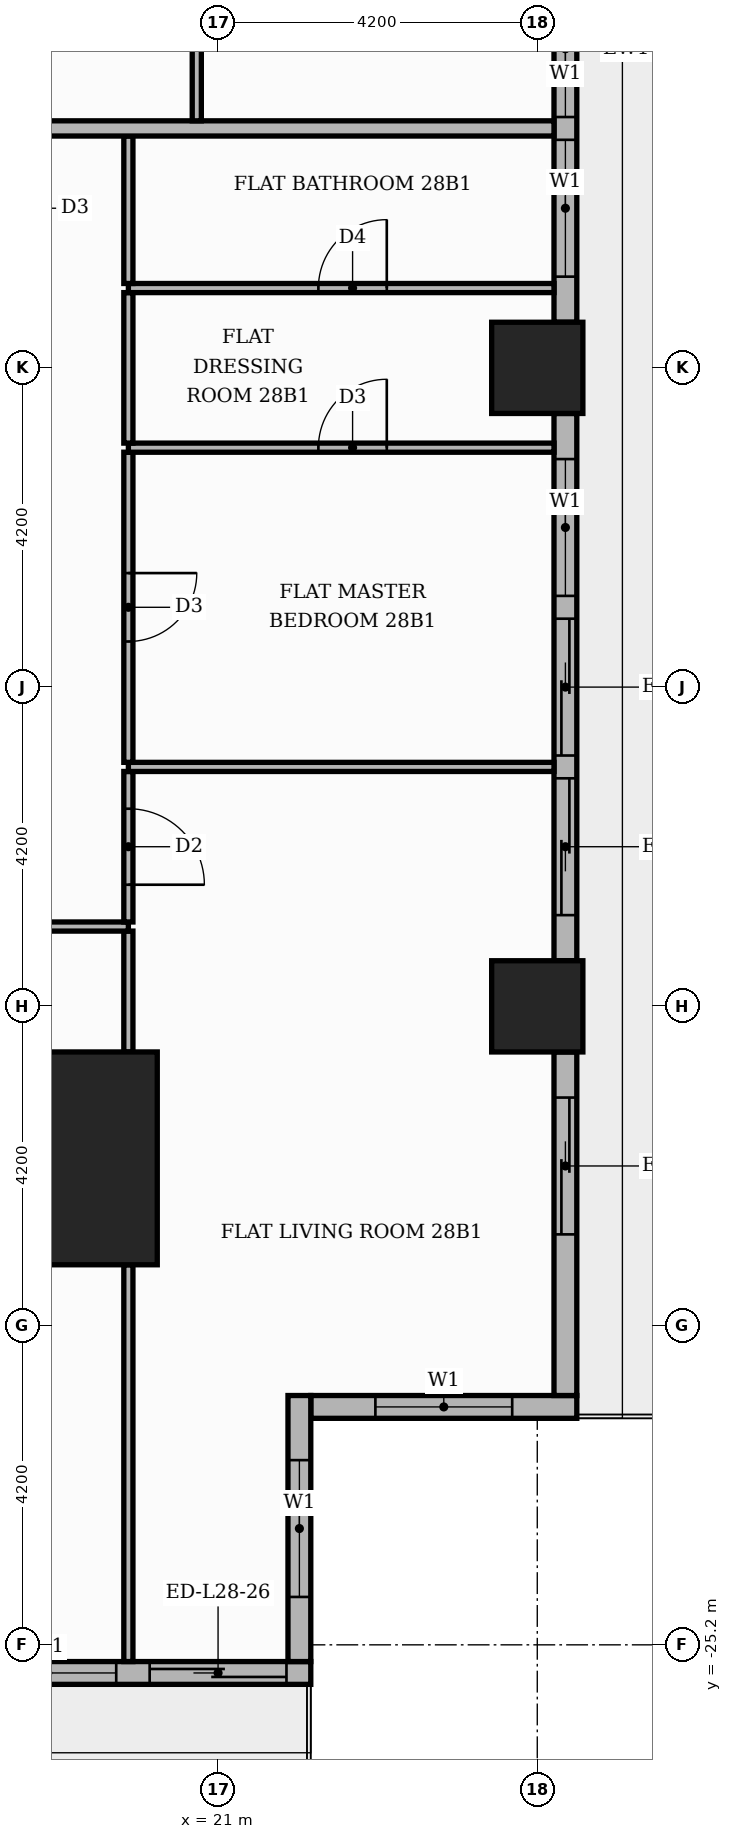
"""IFC4 building model, lengths in metres.
Left out: names, types, materials, properties, quantities, classifications, styles, units other than length and angle.
Written with IfcOpenShell. Run it as: python <this file> out.ifc"""

import sys

from ifc_helpers import new_model, si_unit, direction, frame, frame_2d, origin, origin_2d, place, context, subcontext, project, spatial, rectangle, extrude, element, fill, save


model = new_model("IFC4")
c1 = context("Model", 3, precision=1e-05, world=origin(), true_north=direction((0.0, 1.0)))
c2 = subcontext(c1, "Body", "Model", "MODEL_VIEW")
j1 = project(units=[si_unit("LENGTHUNIT", "METRE"), si_unit("PLANEANGLEUNIT", "RADIAN")], contexts=[c1])
p1 = place(None, origin())
s1 = spatial("IfcSite", under=j1, at=p1, CompositionType="ELEMENT")
p2 = place(p1, origin())
s2 = spatial("IfcBuilding", under=s1, at=p2, CompositionType="ELEMENT")
p3 = place(p2, frame((0.0, 0.0, 118.2)))
s3 = spatial("IfcBuildingStorey", under=s2, at=p3, CompositionType="ELEMENT", Elevation=118.2)
p4 = place(p3, frame((18.8, -18.8, 0.0), z_axis=(0.0, 0.0, 1.0), x_axis=(1.0, 0.0, 0.0)))
e1 = element("IfcColumn", 1, at=p4, inside=s3, PredefinedType="COLUMN", context=c2, shape_type="SweptSolid", body=[
    extrude(rectangle(XDim=2.8, YDim=2.8, at=origin_2d()), origin(), (0.0, 0.0, 1.0), 3.9),
])
for number, where, z_axis, x_axis in (
    (2, (25.2, -8.4, 0.0), (0.0, 0.0, 1.0), (1.0, 0.0, 0.0)),
    (3, (25.2, -16.8, 0.0), (0.0, 0.0, 1.0), (1.0, 0.0, 0.0)),
):
    element("IfcColumn", number, at=place(p3, frame(where, z_axis=z_axis, x_axis=x_axis)), inside=s3, PredefinedType="COLUMN", context=c2, shape_type="SweptSolid", body=[
        extrude(rectangle(XDim=1.2, YDim=1.2, at=origin_2d()), origin(), (0.0, 0.0, 1.0), 3.9),
    ])
p5 = place(p3, frame((22.22, -22.07, 0.0), z_axis=(0.0, 0.0, 1.0), x_axis=(1.0, 0.0, 0.0)))
e4 = element("IfcWall", 4, at=p5, inside=s3, PredefinedType="STANDARD", context=c2, shape_type="SweptSolid", body=[
    extrude(rectangle(XDim=3.5, YDim=0.3, at=frame_2d((1.75, 0.0))), origin(), (0.0, 0.0, 1.0), 3.48),
])
p6 = place(p5, frame((0.85, 0.0, 0.9)))
e5 = element("IfcOpeningElement", 5, at=p6, cuts=e4, PredefinedType="OPENING", context=c2, shape_type="SweptSolid", body=[
    extrude(rectangle(XDim=1.8, YDim=2.1, at=frame_2d((0.9, 1.05))), frame((0.0, 0.16, 0.0), z_axis=(0.0, -1.0, 0.0), x_axis=(1.0, 0.0, 0.0)), (0.0, 0.0, 1.0), 0.32),
])
p7 = place(p3, frame((25.57, -21.92, 0.0), z_axis=(0.0, 0.0, 1.0), x_axis=(0.0, 1.0, 0.0)))
e6 = element("IfcWall", 6, at=p7, inside=s3, PredefinedType="STANDARD", context=c2, shape_type="SweptSolid", body=[
    extrude(rectangle(XDim=4.52, YDim=0.3, at=frame_2d((2.26, 0.0))), origin(), (0.0, 0.0, 1.0), 3.48),
])
p8 = place(p7, frame((2.12, 0.0, 0.0)))
e7 = element("IfcOpeningElement", 7, at=p8, cuts=e6, PredefinedType="OPENING", context=c2, shape_type="SweptSolid", body=[
    extrude(rectangle(XDim=1.8, YDim=2.4, at=frame_2d((0.9, 1.2))), frame((0.0, 0.16, 0.0), z_axis=(0.0, -1.0, 0.0), x_axis=(1.0, 0.0, 0.0)), (0.0, 0.0, 1.0), 0.32),
])
p9 = place(p3, frame((25.57, -16.2, 0.0), z_axis=(0.0, 0.0, 1.0), x_axis=(0.0, 1.0, 0.0)))
e8 = element("IfcWall", 8, at=p9, inside=s3, PredefinedType="STANDARD", context=c2, shape_type="SweptSolid", body=[
    extrude(rectangle(XDim=7.2, YDim=0.3, at=frame_2d((3.6, 0.0))), origin(), (0.0, 0.0, 1.0), 3.48),
])
p10 = place(p9, frame((0.6, 0.0, 0.0)))
e9 = element("IfcOpeningElement", 9, at=p10, cuts=e8, PredefinedType="OPENING", context=c2, shape_type="SweptSolid", body=[
    extrude(rectangle(XDim=1.8, YDim=2.4, at=frame_2d((0.9, 1.2))), frame((0.0, 0.16, 0.0), z_axis=(0.0, -1.0, 0.0), x_axis=(1.0, 0.0, 0.0)), (0.0, 0.0, 1.0), 0.32),
])
p11 = place(p9, frame((2.7, 0.0, 0.0)))
e10 = element("IfcOpeningElement", 10, at=p11, cuts=e8, PredefinedType="OPENING", context=c2, shape_type="SweptSolid", body=[
    extrude(rectangle(XDim=1.8, YDim=2.4, at=frame_2d((0.9, 1.2))), frame((0.0, 0.16, 0.0), z_axis=(0.0, -1.0, 0.0), x_axis=(1.0, 0.0, 0.0)), (0.0, 0.0, 1.0), 0.32),
])
p12 = place(p9, frame((4.8, 0.0, 0.9)))
e11 = element("IfcOpeningElement", 11, at=p12, cuts=e8, PredefinedType="OPENING", context=c2, shape_type="SweptSolid", body=[
    extrude(rectangle(XDim=1.8, YDim=2.1, at=frame_2d((0.9, 1.05))), frame((0.0, 0.16, 0.0), z_axis=(0.0, -1.0, 0.0), x_axis=(1.0, 0.0, 0.0)), (0.0, 0.0, 1.0), 0.32),
])
p13 = place(p3, frame((25.57, -7.8, 0.0), z_axis=(0.0, 0.0, 1.0), x_axis=(0.0, 1.0, 0.0)))
e12 = element("IfcWall", 12, at=p13, inside=s3, PredefinedType="STANDARD", context=c2, shape_type="SweptSolid", body=[
    extrude(rectangle(XDim=7.2, YDim=0.3, at=frame_2d((3.6, 0.0))), origin(), (0.0, 0.0, 1.0), 3.48),
])
p14 = place(p13, frame((0.6, 0.0, 0.9)))
e13 = element("IfcOpeningElement", 13, at=p14, cuts=e12, PredefinedType="OPENING", context=c2, shape_type="SweptSolid", body=[
    extrude(rectangle(XDim=1.8, YDim=2.1, at=frame_2d((0.9, 1.05))), frame((0.0, 0.16, 0.0), z_axis=(0.0, -1.0, 0.0), x_axis=(1.0, 0.0, 0.0)), (0.0, 0.0, 1.0), 0.32),
])
p15 = place(p13, frame((2.7, 0.0, 0.9)))
e14 = element("IfcOpeningElement", 14, at=p15, cuts=e12, PredefinedType="OPENING", context=c2, shape_type="SweptSolid", body=[
    extrude(rectangle(XDim=1.8, YDim=2.1, at=frame_2d((0.9, 1.05))), frame((0.0, 0.16, 0.0), z_axis=(0.0, -1.0, 0.0), x_axis=(1.0, 0.0, 0.0)), (0.0, 0.0, 1.0), 0.32),
])
p16 = place(p13, frame((4.8, 0.0, 0.0)))
e15 = element("IfcOpeningElement", 15, at=p16, cuts=e12, PredefinedType="OPENING", context=c2, shape_type="SweptSolid", body=[
    extrude(rectangle(XDim=1.8, YDim=2.4, at=frame_2d((0.9, 1.2))), frame((0.0, 0.16, 0.0), z_axis=(0.0, -1.0, 0.0), x_axis=(1.0, 0.0, 0.0)), (0.0, 0.0, 1.0), 0.32),
])
p17 = place(p3, frame((17.4, -25.57, 0.0), z_axis=(0.0, 0.0, 1.0), x_axis=(1.0, 0.0, 0.0)))
e16 = element("IfcWall", 16, at=p17, inside=s3, PredefinedType="STANDARD", context=c2, shape_type="SweptSolid", body=[
    extrude(rectangle(XDim=4.82, YDim=0.3, at=frame_2d((2.41, 0.0))), origin(), (0.0, 0.0, 1.0), 3.48),
])
p18 = place(p17, frame((2.7, 0.0, 0.0)))
e17 = element("IfcOpeningElement", 17, at=p18, cuts=e16, PredefinedType="OPENING", context=c2, shape_type="SweptSolid", body=[
    extrude(rectangle(XDim=1.8, YDim=2.4, at=frame_2d((0.9, 1.2))), frame((0.0, 0.16, 0.0), z_axis=(0.0, -1.0, 0.0), x_axis=(1.0, 0.0, 0.0)), (0.0, 0.0, 1.0), 0.32),
])
p19 = place(p17, frame((0.46, 0.0, 0.9)))
e18 = element("IfcOpeningElement", 18, at=p19, cuts=e16, PredefinedType="OPENING", context=c2, shape_type="SweptSolid", body=[
    extrude(rectangle(XDim=1.8, YDim=2.1, at=frame_2d((0.9, 1.05))), frame((0.0, 0.16, 0.0), z_axis=(0.0, -1.0, 0.0), x_axis=(1.0, 0.0, 0.0)), (0.0, 0.0, 1.0), 0.32),
])
p20 = place(p3, frame((22.07, -25.42, 0.0), z_axis=(0.0, 0.0, 1.0), x_axis=(0.0, 1.0, 0.0)))
e19 = element("IfcWall", 19, at=p20, inside=s3, PredefinedType="STANDARD", context=c2, shape_type="SweptSolid", body=[
    extrude(rectangle(XDim=3.5, YDim=0.3, at=frame_2d((1.75, 0.0))), origin(), (0.0, 0.0, 1.0), 3.48),
])
p21 = place(p20, frame((0.85, 0.0, 0.9)))
e20 = element("IfcOpeningElement", 20, at=p21, cuts=e19, PredefinedType="OPENING", context=c2, shape_type="SweptSolid", body=[
    extrude(rectangle(XDim=1.8, YDim=2.1, at=frame_2d((0.9, 1.05))), frame((0.0, 0.16, 0.0), z_axis=(0.0, -1.0, 0.0), x_axis=(1.0, 0.0, 0.0)), (0.0, 0.0, 1.0), 0.32),
])
p22 = place(p3, frame((19.82, -25.42, 0.0), z_axis=(0.0, 0.0, 1.0), x_axis=(0.0, 1.0, 0.0)))
e21 = element("IfcWall", 21, at=p22, inside=s3, PredefinedType="PARTITIONING", context=c2, shape_type="SweptSolid", body=[
    extrude(rectangle(XDim=5.22, YDim=0.12, at=frame_2d((2.61, 0.0))), origin(), (0.0, 0.0, 1.0), 3.48),
])
p23 = place(p3, frame((19.82, -17.4, 0.0), z_axis=(0.0, 0.0, 1.0), x_axis=(0.0, 1.0, 0.0)))
e22 = element("IfcWall", 22, at=p23, inside=s3, PredefinedType="PARTITIONING", context=c2, shape_type="SweptSolid", body=[
    extrude(rectangle(XDim=1.59, YDim=0.12, at=frame_2d((0.795, 0.0))), origin(), (0.0, 0.0, 1.0), 3.48),
])
p24 = place(p3, frame((13.75, -15.75, 0.0), z_axis=(0.0, 0.0, 1.0), x_axis=(1.0, 0.0, 0.0)))
e23 = element("IfcWall", 23, at=p24, inside=s3, PredefinedType="PARTITIONING", context=c2, shape_type="SweptSolid", body=[
    extrude(rectangle(XDim=6.07, YDim=0.12, at=frame_2d((3.035, 0.0))), origin(), (0.0, 0.0, 1.0), 3.48),
])
p25 = place(p24, frame((2.485, 0.0, 0.0)))
e24 = element("IfcOpeningElement", 24, at=p25, cuts=e23, PredefinedType="OPENING", context=c2, shape_type="SweptSolid", body=[
    extrude(rectangle(XDim=1.0, YDim=2.1, at=frame_2d((0.5, 1.05))), frame((0.0, 0.07, 0.0), z_axis=(0.0, -1.0, 0.0), x_axis=(1.0, 0.0, 0.0)), (0.0, 0.0, 1.0), 0.14),
])
p26 = place(p3, frame((19.82, -15.69, 0.0), z_axis=(0.0, 0.0, 1.0), x_axis=(0.0, 1.0, 0.0)))
e25 = element("IfcWall", 25, at=p26, inside=s3, PredefinedType="PARTITIONING", context=c2, shape_type="SweptSolid", body=[
    extrude(rectangle(XDim=1.98, YDim=0.12, at=frame_2d((0.99, 0.0))), origin(), (0.0, 0.0, 1.0), 3.48),
])
p27 = place(p26, frame((0.49, 0.0, 0.0)))
e26 = element("IfcOpeningElement", 26, at=p27, cuts=e25, PredefinedType="OPENING", context=c2, shape_type="SweptSolid", body=[
    extrude(rectangle(XDim=1.0, YDim=2.1, at=frame_2d((0.5, 1.05))), frame((0.0, 0.07, 0.0), z_axis=(0.0, -1.0, 0.0), x_axis=(1.0, 0.0, 0.0)), (0.0, 0.0, 1.0), 0.14),
])
p28 = place(p3, frame((19.82, -13.65, 0.0), z_axis=(0.0, 0.0, 1.0), x_axis=(1.0, 0.0, 0.0)))
e27 = element("IfcWall", 27, at=p28, inside=s3, PredefinedType="PARTITIONING", context=c2, shape_type="SweptSolid", body=[
    extrude(rectangle(XDim=5.6, YDim=0.12, at=frame_2d((2.8, 0.0))), origin(), (0.0, 0.0, 1.0), 3.48),
])
p29 = place(p3, frame((19.82, -13.59, 0.0), z_axis=(0.0, 0.0, 1.0), x_axis=(0.0, 1.0, 0.0)))
e28 = element("IfcWall", 28, at=p29, inside=s3, PredefinedType="PARTITIONING", context=c2, shape_type="SweptSolid", body=[
    extrude(rectangle(XDim=4.08, YDim=0.12, at=frame_2d((2.04, 0.0))), origin(), (0.0, 0.0, 1.0), 3.48),
])
p30 = place(p29, frame((1.59, 0.0, 0.0)))
e29 = element("IfcOpeningElement", 29, at=p30, cuts=e28, PredefinedType="OPENING", context=c2, shape_type="SweptSolid", body=[
    extrude(rectangle(XDim=0.9, YDim=2.1, at=frame_2d((0.45, 1.05))), frame((0.0, 0.07, 0.0), z_axis=(0.0, -1.0, 0.0), x_axis=(1.0, 0.0, 0.0)), (0.0, 0.0, 1.0), 0.14),
])
p31 = place(p3, frame((19.82, -9.45, 0.0), z_axis=(0.0, 0.0, 1.0), x_axis=(1.0, 0.0, 0.0)))
e30 = element("IfcWall", 30, at=p31, inside=s3, PredefinedType="PARTITIONING", context=c2, shape_type="SweptSolid", body=[
    extrude(rectangle(XDim=5.6, YDim=0.12, at=frame_2d((2.8, 0.0))), origin(), (0.0, 0.0, 1.0), 3.48),
])
p32 = place(p31, frame((2.5, 0.0, 0.0)))
e31 = element("IfcOpeningElement", 31, at=p32, cuts=e30, PredefinedType="OPENING", context=c2, shape_type="SweptSolid", body=[
    extrude(rectangle(XDim=0.9, YDim=2.1, at=frame_2d((0.45, 1.05))), frame((0.0, 0.07, 0.0), z_axis=(0.0, -1.0, 0.0), x_axis=(1.0, 0.0, 0.0)), (0.0, 0.0, 1.0), 0.14),
])
p33 = place(p3, frame((19.82, -9.39, 0.0), z_axis=(0.0, 0.0, 1.0), x_axis=(0.0, 1.0, 0.0)))
e32 = element("IfcWall", 32, at=p33, inside=s3, PredefinedType="PARTITIONING", context=c2, shape_type="SweptSolid", body=[
    extrude(rectangle(XDim=1.98, YDim=0.12, at=frame_2d((0.99, 0.0))), origin(), (0.0, 0.0, 1.0), 3.48),
])
p34 = place(p3, frame((19.82, -7.35, 0.0), z_axis=(0.0, 0.0, 1.0), x_axis=(1.0, 0.0, 0.0)))
e33 = element("IfcWall", 33, at=p34, inside=s3, PredefinedType="PARTITIONING", context=c2, shape_type="SweptSolid", body=[
    extrude(rectangle(XDim=5.6, YDim=0.12, at=frame_2d((2.8, 0.0))), origin(), (0.0, 0.0, 1.0), 3.48),
])
p35 = place(p34, frame((2.5, 0.0, 0.0)))
e34 = element("IfcOpeningElement", 34, at=p35, cuts=e33, PredefinedType="OPENING", context=c2, shape_type="SweptSolid", body=[
    extrude(rectangle(XDim=0.9, YDim=2.1, at=frame_2d((0.45, 1.05))), frame((0.0, 0.07, 0.0), z_axis=(0.0, -1.0, 0.0), x_axis=(1.0, 0.0, 0.0)), (0.0, 0.0, 1.0), 0.14),
])
p36 = place(p3, frame((19.82, -7.29, 0.0), z_axis=(0.0, 0.0, 1.0), x_axis=(0.0, 1.0, 0.0)))
e35 = element("IfcWall", 35, at=p36, inside=s3, PredefinedType="PARTITIONING", context=c2, shape_type="SweptSolid", body=[
    extrude(rectangle(XDim=1.94, YDim=0.12, at=frame_2d((0.97, 0.0))), origin(), (0.0, 0.0, 1.0), 3.48),
])
p37 = place(p3, frame((13.65, -5.25, 0.0), z_axis=(0.0, 0.0, 1.0), x_axis=(1.0, 0.0, 0.0)))
e36 = element("IfcWall", 36, at=p37, inside=s3, PredefinedType="PARTITIONING", context=c2, shape_type="SweptSolid", body=[
    extrude(rectangle(XDim=11.77, YDim=0.2, at=frame_2d((5.885, 0.0))), origin(), (0.0, 0.0, 1.0), 3.48),
])
p38 = place(p3, frame((20.72, -5.15, 0.0), z_axis=(0.0, 0.0, 1.0), x_axis=(0.0, 1.0, 0.0)))
e37 = element("IfcWall", 37, at=p38, inside=s3, PredefinedType="PARTITIONING", context=c2, shape_type="SweptSolid", body=[
    extrude(rectangle(XDim=8.24, YDim=0.12, at=frame_2d((4.12, 0.0))), origin(), (0.0, 0.0, 1.0), 3.48),
])
p39 = place(p38, frame((3.65, 0.0, 0.0)))
e38 = element("IfcOpeningElement", 38, at=p39, cuts=e37, PredefinedType="OPENING", context=c2, shape_type="SweptSolid", body=[
    extrude(rectangle(XDim=0.9, YDim=2.1, at=frame_2d((0.45, 1.05))), frame((0.0, 0.07, 0.0), z_axis=(0.0, -1.0, 0.0), x_axis=(1.0, 0.0, 0.0)), (0.0, 0.0, 1.0), 0.14),
])
p40 = place(p6, origin())
e39 = element("IfcWindow", 39, at=p40, inside=s3, PartitioningType="SINGLE_PANEL", PredefinedType="WINDOW", context=c2, shape_type="SweptSolid", body=[
    extrude(rectangle(XDim=1.8, YDim=2.1, at=frame_2d((0.9, 1.05))), frame((0.0, 0.03, 0.0), z_axis=(0.0, -1.0, 0.0), x_axis=(1.0, 0.0, 0.0)), (0.0, 0.0, 1.0), 0.06),
])
fill(e5, e39)
p41 = place(p8, origin())
e40 = element("IfcDoor", 40, at=p41, inside=s3, OperationType="SLIDING_TO_RIGHT", PredefinedType="DOOR", context=c2, shape_type="SweptSolid", body=[
    extrude(rectangle(XDim=1.8, YDim=2.4, at=frame_2d((0.9, 1.2))), frame((0.0, 0.025, 0.0), z_axis=(0.0, -1.0, 0.0), x_axis=(1.0, 0.0, 0.0)), (0.0, 0.0, 1.0), 0.05),
])
fill(e7, e40)
p42 = place(p10, origin())
e41 = element("IfcDoor", 41, at=p42, inside=s3, OperationType="SLIDING_TO_LEFT", PredefinedType="DOOR", context=c2, shape_type="SweptSolid", body=[
    extrude(rectangle(XDim=1.8, YDim=2.4, at=frame_2d((0.9, 1.2))), frame((0.0, 0.025, 0.0), z_axis=(0.0, -1.0, 0.0), x_axis=(1.0, 0.0, 0.0)), (0.0, 0.0, 1.0), 0.05),
])
fill(e9, e41)
p43 = place(p11, origin())
e42 = element("IfcDoor", 42, at=p43, inside=s3, OperationType="SLIDING_TO_RIGHT", PredefinedType="DOOR", context=c2, shape_type="SweptSolid", body=[
    extrude(rectangle(XDim=1.8, YDim=2.4, at=frame_2d((0.9, 1.2))), frame((0.0, 0.025, 0.0), z_axis=(0.0, -1.0, 0.0), x_axis=(1.0, 0.0, 0.0)), (0.0, 0.0, 1.0), 0.05),
])
fill(e10, e42)
p44 = place(p12, origin())
e43 = element("IfcWindow", 43, at=p44, inside=s3, PartitioningType="SINGLE_PANEL", PredefinedType="WINDOW", context=c2, shape_type="SweptSolid", body=[
    extrude(rectangle(XDim=1.8, YDim=2.1, at=frame_2d((0.9, 1.05))), frame((0.0, 0.03, 0.0), z_axis=(0.0, -1.0, 0.0), x_axis=(1.0, 0.0, 0.0)), (0.0, 0.0, 1.0), 0.06),
])
fill(e11, e43)
p45 = place(p14, origin())
e44 = element("IfcWindow", 44, at=p45, inside=s3, PartitioningType="SINGLE_PANEL", PredefinedType="WINDOW", context=c2, shape_type="SweptSolid", body=[
    extrude(rectangle(XDim=1.8, YDim=2.1, at=frame_2d((0.9, 1.05))), frame((0.0, 0.03, 0.0), z_axis=(0.0, -1.0, 0.0), x_axis=(1.0, 0.0, 0.0)), (0.0, 0.0, 1.0), 0.06),
])
fill(e13, e44)
p46 = place(p15, origin())
e45 = element("IfcWindow", 45, at=p46, inside=s3, PartitioningType="SINGLE_PANEL", PredefinedType="WINDOW", context=c2, shape_type="SweptSolid", body=[
    extrude(rectangle(XDim=1.8, YDim=2.1, at=frame_2d((0.9, 1.05))), frame((0.0, 0.03, 0.0), z_axis=(0.0, -1.0, 0.0), x_axis=(1.0, 0.0, 0.0)), (0.0, 0.0, 1.0), 0.06),
])
fill(e14, e45)
p47 = place(p18, origin())
e46 = element("IfcDoor", 46, at=p47, inside=s3, OperationType="SLIDING_TO_LEFT", PredefinedType="DOOR", context=c2, shape_type="SweptSolid", body=[
    extrude(rectangle(XDim=1.8, YDim=2.4, at=frame_2d((0.9, 1.2))), frame((0.0, 0.025, 0.0), z_axis=(0.0, -1.0, 0.0), x_axis=(1.0, 0.0, 0.0)), (0.0, 0.0, 1.0), 0.05),
])
fill(e17, e46)
p48 = place(p19, origin())
e47 = element("IfcWindow", 47, at=p48, inside=s3, PartitioningType="SINGLE_PANEL", PredefinedType="WINDOW", context=c2, shape_type="SweptSolid", body=[
    extrude(rectangle(XDim=1.8, YDim=2.1, at=frame_2d((0.9, 1.05))), frame((0.0, 0.03, 0.0), z_axis=(0.0, -1.0, 0.0), x_axis=(1.0, 0.0, 0.0)), (0.0, 0.0, 1.0), 0.06),
])
fill(e18, e47)
p49 = place(p21, origin())
e48 = element("IfcWindow", 48, at=p49, inside=s3, PartitioningType="SINGLE_PANEL", PredefinedType="WINDOW", context=c2, shape_type="SweptSolid", body=[
    extrude(rectangle(XDim=1.8, YDim=2.1, at=frame_2d((0.9, 1.05))), frame((0.0, 0.03, 0.0), z_axis=(0.0, -1.0, 0.0), x_axis=(1.0, 0.0, 0.0)), (0.0, 0.0, 1.0), 0.06),
])
fill(e20, e48)
p50 = place(p27, frame((1.0, 0.0, 0.0), z_axis=(0.0, 0.0, 1.0), x_axis=(-1.0, 0.0, 0.0)))
e49 = element("IfcDoor", 49, at=p50, inside=s3, OperationType="SINGLE_SWING_LEFT", PredefinedType="DOOR", context=c2, shape_type="SweptSolid", body=[
    extrude(rectangle(XDim=1.0, YDim=2.1, at=frame_2d((0.5, 1.05))), frame((0.0, 0.025, 0.0), z_axis=(0.0, -1.0, 0.0), x_axis=(1.0, 0.0, 0.0)), (0.0, 0.0, 1.0), 0.05),
])
fill(e26, e49)
p51 = place(p30, frame((0.9, 0.0, 0.0), z_axis=(0.0, 0.0, 1.0), x_axis=(-1.0, 0.0, 0.0)))
e50 = element("IfcDoor", 50, at=p51, inside=s3, OperationType="SINGLE_SWING_RIGHT", PredefinedType="DOOR", context=c2, shape_type="SweptSolid", body=[
    extrude(rectangle(XDim=0.9, YDim=2.1, at=frame_2d((0.45, 1.05))), frame((0.0, 0.025, 0.0), z_axis=(0.0, -1.0, 0.0), x_axis=(1.0, 0.0, 0.0)), (0.0, 0.0, 1.0), 0.05),
])
fill(e29, e50)
p52 = place(p32, origin())
e51 = element("IfcDoor", 51, at=p52, inside=s3, OperationType="SINGLE_SWING_RIGHT", PredefinedType="DOOR", context=c2, shape_type="SweptSolid", body=[
    extrude(rectangle(XDim=0.9, YDim=2.1, at=frame_2d((0.45, 1.05))), frame((0.0, 0.025, 0.0), z_axis=(0.0, -1.0, 0.0), x_axis=(1.0, 0.0, 0.0)), (0.0, 0.0, 1.0), 0.05),
])
fill(e31, e51)
p53 = place(p35, origin())
e52 = element("IfcDoor", 52, at=p53, inside=s3, OperationType="SINGLE_SWING_RIGHT", PredefinedType="DOOR", context=c2, shape_type="SweptSolid", body=[
    extrude(rectangle(XDim=0.9, YDim=2.1, at=frame_2d((0.45, 1.05))), frame((0.0, 0.025, 0.0), z_axis=(0.0, -1.0, 0.0), x_axis=(1.0, 0.0, 0.0)), (0.0, 0.0, 1.0), 0.05),
])
fill(e34, e52)
save(model, sys.argv[1])
